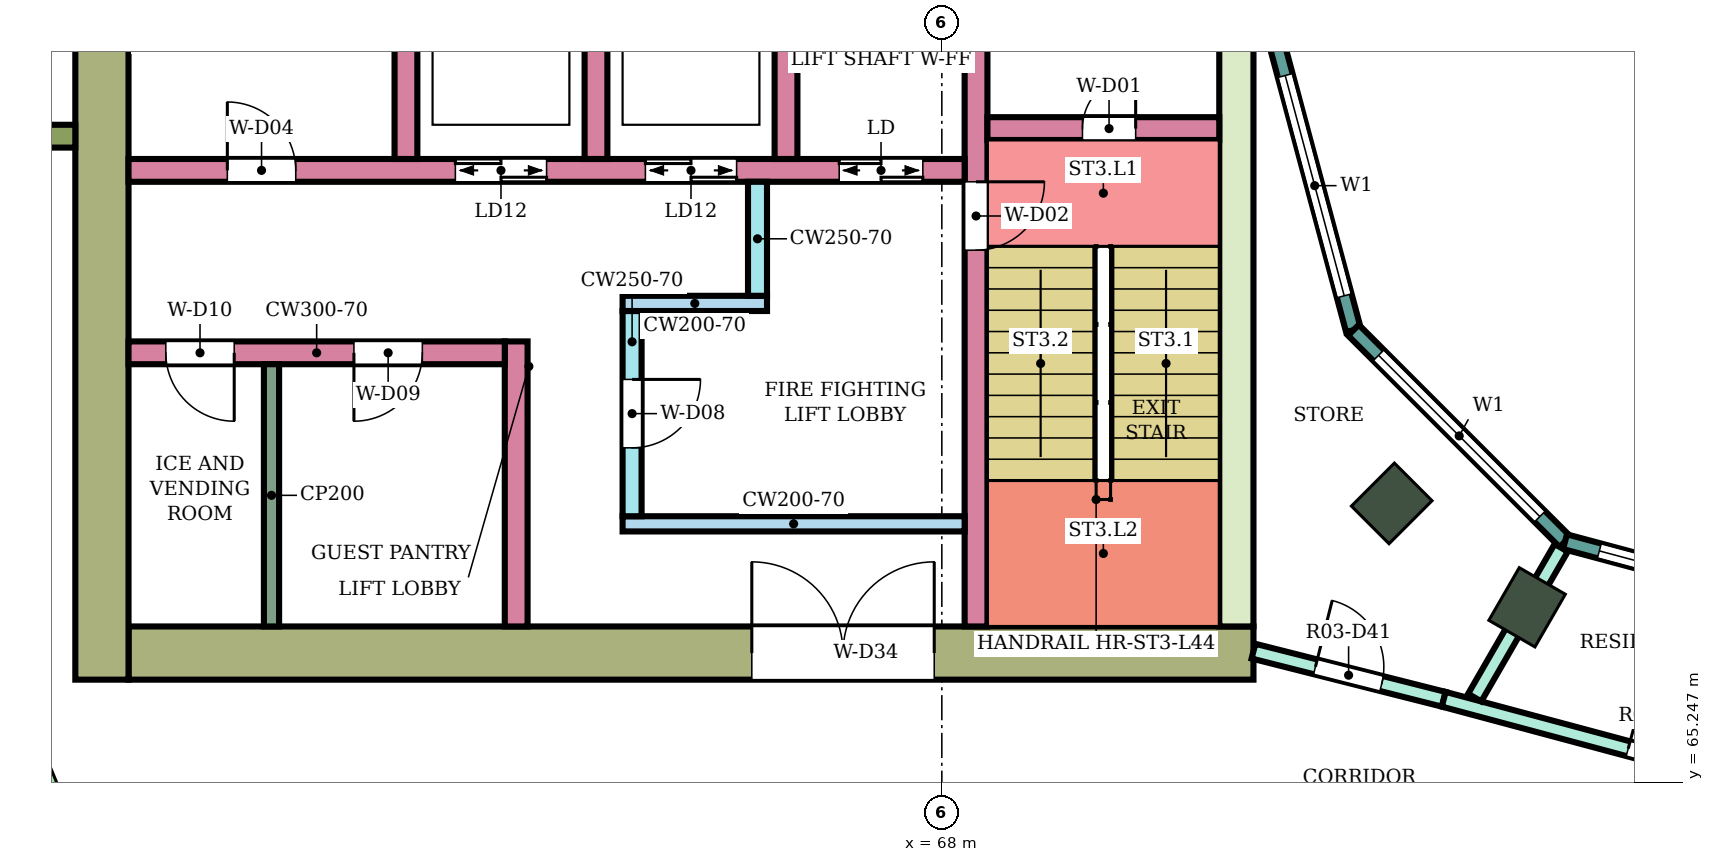
"""IFC4 building model, lengths in metres.
Left out: names, types, materials, properties, quantities, classifications, styles, units other than length and angle.
Written with IfcOpenShell. Run it as: python <this file> out.ifc"""

import sys

from ifc_helpers import new_model, si_unit, direction, frame, frame_2d, origin, origin_2d, place, context, subcontext, project, spatial, rectangle, extrude, element, fill, save


model = new_model("IFC4")
c1 = context("Model", 3, precision=1e-05, world=origin(), true_north=direction((0.0, 1.0)))
c2 = subcontext(c1, "Body", "Model", "MODEL_VIEW")
j1 = project(units=[si_unit("LENGTHUNIT", "METRE"), si_unit("PLANEANGLEUNIT", "RADIAN")], contexts=[c1])
p1 = place(None, origin())
s1 = spatial("IfcSite", under=j1, at=p1, CompositionType="ELEMENT")
p2 = place(p1, origin())
s2 = spatial("IfcBuilding", under=s1, at=p2, CompositionType="ELEMENT")
p3 = place(p2, frame((0.0, 0.0, 190.5)))
s3 = spatial("IfcBuildingStorey", under=s2, at=p3, CompositionType="ELEMENT", Elevation=190.5)
for number, where, z_axis, x_axis in (
    (1, (73.919, 68.919, 0.0), (0.0, 0.0, 1.0), (-0.707, -0.707, 0.0)),
    (2, (75.7, 67.552, 0.0), (0.0, 0.0, 1.0), (-0.5, -0.866, 0.0)),
):
    element("IfcColumn", number, at=place(p3, frame(where, z_axis=z_axis, x_axis=x_axis)), inside=s3, PredefinedType="COLUMN", context=c2, shape_type="SweptSolid", body=[
        extrude(rectangle(XDim=0.8, YDim=0.7, at=origin_2d()), origin(), (0.0, 0.0, 1.0), 4.1),
    ])
p4 = place(p3, frame((72.1, 66.95, 0.0), z_axis=(0.0, 0.0, 1.0), x_axis=(-1.0, 0.0, 0.0)))
e3 = element("IfcWall", 3, at=p4, inside=s3, PredefinedType="SHEAR", context=c2, shape_type="SweptSolid", body=[
    extrude(rectangle(XDim=14.8, YDim=0.7, at=frame_2d((7.4, 0.0))), origin(), (0.0, 0.0, 1.0), 3.78),
])
p5 = place(p4, frame((4.2, 0.0, 0.0)))
e4 = element("IfcOpeningElement", 4, at=p5, cuts=e3, PredefinedType="OPENING", context=c2, shape_type="SweptSolid", body=[
    extrude(rectangle(XDim=2.4, YDim=2.4, at=frame_2d((1.2, 1.2))), frame((0.0, 0.36, 0.0), z_axis=(0.0, -1.0, 0.0), x_axis=(1.0, 0.0, 0.0)), (0.0, 0.0, 1.0), 0.72),
])
p6 = place(p3, frame((71.875, 75.0, 0.0), z_axis=(0.0, 0.0, 1.0), x_axis=(0.0, -1.0, 0.0)))
e5 = element("IfcWall", 5, at=p6, inside=s3, PredefinedType="SHEAR", context=c2, shape_type="SweptSolid", body=[
    extrude(rectangle(XDim=7.7, YDim=0.45, at=frame_2d((3.85, 0.0))), origin(), (0.0, 0.0, 1.0), 3.78),
])
p7 = place(p3, frame((56.95, 83.4, 0.0), z_axis=(0.0, 0.0, 1.0), x_axis=(0.0, -1.0, 0.0)))
e6 = element("IfcWall", 6, at=p7, inside=s3, PredefinedType="SHEAR", context=c2, shape_type="SweptSolid", body=[
    extrude(rectangle(XDim=16.8, YDim=0.7, at=frame_2d((8.4, 0.0))), origin(), (0.0, 0.0, 1.0), 3.78),
])
p8 = place(p3, frame((68.45, 75.0, 0.0), z_axis=(0.0, 0.0, 1.0), x_axis=(0.0, -1.0, 0.0)))
e7 = element("IfcWall", 7, at=p8, inside=s3, PredefinedType="SHEAR", context=c2, shape_type="SweptSolid", body=[
    extrude(rectangle(XDim=7.7, YDim=0.3, at=frame_2d((3.85, 0.0))), origin(), (0.0, 0.0, 1.0), 3.78),
])
p9 = place(p8, frame((1.85, 0.0, 0.0)))
e8 = element("IfcOpeningElement", 8, at=p9, cuts=e7, PredefinedType="OPENING", context=c2, shape_type="SweptSolid", body=[
    extrude(rectangle(XDim=0.9, YDim=2.1, at=frame_2d((0.45, 1.05))), frame((0.0, 0.16, 0.0), z_axis=(0.0, -1.0, 0.0), x_axis=(1.0, 0.0, 0.0)), (0.0, 0.0, 1.0), 0.32),
])
p10 = place(p3, frame((71.65, 73.85, 0.0), z_axis=(0.0, 0.0, 1.0), x_axis=(-1.0, 0.0, 0.0)))
e9 = element("IfcWall", 9, at=p10, inside=s3, PredefinedType="SHEAR", context=c2, shape_type="SweptSolid", body=[
    extrude(rectangle(XDim=3.05, YDim=0.3, at=frame_2d((1.525, 0.0))), origin(), (0.0, 0.0, 1.0), 3.78),
])
p11 = place(p10, frame((1.1, 0.0, 0.0)))
e10 = element("IfcOpeningElement", 10, at=p11, cuts=e9, PredefinedType="OPENING", context=c2, shape_type="SweptSolid", body=[
    extrude(rectangle(XDim=0.7, YDim=2.0, at=frame_2d((0.35, 1.0))), frame((0.0, 0.16, 0.0), z_axis=(0.0, -1.0, 0.0), x_axis=(1.0, 0.0, 0.0)), (0.0, 0.0, 1.0), 0.32),
])
p12 = place(p3, frame((68.3, 73.3, 0.0), z_axis=(0.0, 0.0, 1.0), x_axis=(-1.0, 0.0, 0.0)))
e11 = element("IfcWall", 11, at=p12, inside=s3, PredefinedType="SHEAR", context=c2, shape_type="SweptSolid", body=[
    extrude(rectangle(XDim=11.0, YDim=0.3, at=frame_2d((5.5, 0.0))), origin(), (0.0, 0.0, 1.0), 3.78),
])
p13 = place(p12, frame((0.55, 0.0, 0.0)))
e12 = element("IfcOpeningElement", 12, at=p13, cuts=e11, PredefinedType="OPENING", context=c2, shape_type="SweptSolid", body=[
    extrude(rectangle(XDim=1.1, YDim=2.1, at=frame_2d((0.55, 1.05))), frame((0.0, 0.16, 0.0), z_axis=(0.0, -1.0, 0.0), x_axis=(1.0, 0.0, 0.0)), (0.0, 0.0, 1.0), 0.32),
])
p14 = place(p12, frame((3.0, 0.0, 0.0)))
e13 = element("IfcOpeningElement", 13, at=p14, cuts=e11, PredefinedType="OPENING", context=c2, shape_type="SweptSolid", body=[
    extrude(rectangle(XDim=1.2, YDim=2.1, at=frame_2d((0.6, 1.05))), frame((0.0, 0.16, 0.0), z_axis=(0.0, -1.0, 0.0), x_axis=(1.0, 0.0, 0.0)), (0.0, 0.0, 1.0), 0.32),
])
p15 = place(p12, frame((5.5, 0.0, 0.0)))
e14 = element("IfcOpeningElement", 14, at=p15, cuts=e11, PredefinedType="OPENING", context=c2, shape_type="SweptSolid", body=[
    extrude(rectangle(XDim=1.2, YDim=2.1, at=frame_2d((0.6, 1.05))), frame((0.0, 0.16, 0.0), z_axis=(0.0, -1.0, 0.0), x_axis=(1.0, 0.0, 0.0)), (0.0, 0.0, 1.0), 0.32),
])
p16 = place(p12, frame((8.8, 0.0, 0.0)))
e15 = element("IfcOpeningElement", 15, at=p16, cuts=e11, PredefinedType="OPENING", context=c2, shape_type="SweptSolid", body=[
    extrude(rectangle(XDim=0.9, YDim=2.1, at=frame_2d((0.45, 1.05))), frame((0.0, 0.16, 0.0), z_axis=(0.0, -1.0, 0.0), x_axis=(1.0, 0.0, 0.0)), (0.0, 0.0, 1.0), 0.32),
])
for number, where, z_axis, x_axis in (
    (16, (65.95, 76.0, 0.0), (0.0, 0.0, 1.0), (0.0, -1.0, 0.0)),
    (17, (63.45, 76.0, 0.0), (0.0, 0.0, 1.0), (0.0, -1.0, 0.0)),
    (18, (60.95, 76.0, 0.0), (0.0, 0.0, 1.0), (0.0, -1.0, 0.0)),
):
    element("IfcWall", number, at=place(p3, frame(where, z_axis=z_axis, x_axis=x_axis)), inside=s3, PredefinedType="SHEAR", context=c2, shape_type="SweptSolid", body=[
        extrude(rectangle(XDim=2.55, YDim=0.3, at=frame_2d((1.275, 0.0))), origin(), (0.0, 0.0, 1.0), 3.78),
    ])
p17 = place(p3, frame((68.3, 68.65, 0.0), z_axis=(0.0, 0.0, 1.0), x_axis=(-1.0, 0.0, 0.0)))
e19 = element("IfcWall", 19, at=p17, inside=s3, PredefinedType="SHEAR", context=c2, shape_type="SweptSolid", body=[
    extrude(rectangle(XDim=4.5, YDim=0.2, at=frame_2d((2.25, 0.0))), origin(), (0.0, 0.0, 1.0), 3.78),
])
p18 = place(p3, frame((63.925, 71.45, 0.0), z_axis=(0.0, 0.0, 1.0), x_axis=(0.0, -1.0, 0.0)))
e20 = element("IfcWall", 20, at=p18, inside=s3, PredefinedType="SHEAR", context=c2, shape_type="SweptSolid", body=[
    extrude(rectangle(XDim=2.7, YDim=0.25, at=frame_2d((1.35, 0.0))), origin(), (0.0, 0.0, 1.0), 3.78),
])
p19 = place(p18, frame((0.9, 0.0, 0.0)))
e21 = element("IfcOpeningElement", 21, at=p19, cuts=e20, PredefinedType="OPENING", context=c2, shape_type="SweptSolid", body=[
    extrude(rectangle(XDim=0.9, YDim=2.1, at=frame_2d((0.45, 1.05))), frame((0.0, 0.135, 0.0), z_axis=(0.0, -1.0, 0.0), x_axis=(1.0, 0.0, 0.0)), (0.0, 0.0, 1.0), 0.27),
])
p20 = place(p3, frame((65.7, 71.55, 0.0), z_axis=(0.0, 0.0, 1.0), x_axis=(-1.0, 0.0, 0.0)))
e22 = element("IfcWall", 22, at=p20, inside=s3, PredefinedType="SHEAR", context=c2, shape_type="SweptSolid", body=[
    extrude(rectangle(XDim=1.9, YDim=0.2, at=frame_2d((0.95, 0.0))), origin(), (0.0, 0.0, 1.0), 3.78),
])
p21 = place(p3, frame((65.575, 73.15, 0.0), z_axis=(0.0, 0.0, 1.0), x_axis=(0.0, -1.0, 0.0)))
e23 = element("IfcWall", 23, at=p21, inside=s3, PredefinedType="SHEAR", context=c2, shape_type="SweptSolid", body=[
    extrude(rectangle(XDim=1.5, YDim=0.25, at=frame_2d((0.75, 0.0))), origin(), (0.0, 0.0, 1.0), 3.78),
])
p22 = place(p3, frame((62.4, 71.05, 0.0), z_axis=(0.0, 0.0, 1.0), x_axis=(0.0, -1.0, 0.0)))
e24 = element("IfcWall", 24, at=p22, inside=s3, PredefinedType="SHEAR", context=c2, shape_type="SweptSolid", body=[
    extrude(rectangle(XDim=3.75, YDim=0.3, at=frame_2d((1.875, 0.0))), origin(), (0.0, 0.0, 1.0), 3.78),
])
p23 = place(p3, frame((62.25, 70.9, 0.0), z_axis=(0.0, 0.0, 1.0), x_axis=(-1.0, 0.0, 0.0)))
e25 = element("IfcWall", 25, at=p23, inside=s3, PredefinedType="SHEAR", context=c2, shape_type="SweptSolid", body=[
    extrude(rectangle(XDim=4.95, YDim=0.3, at=frame_2d((2.475, 0.0))), origin(), (0.0, 0.0, 1.0), 3.78),
])
p24 = place(p23, frame((1.084, 0.0, 0.0)))
e26 = element("IfcOpeningElement", 26, at=p24, cuts=e25, PredefinedType="OPENING", context=c2, shape_type="SweptSolid", body=[
    extrude(rectangle(XDim=0.9, YDim=2.1, at=frame_2d((0.45, 1.05))), frame((0.0, 0.16, 0.0), z_axis=(0.0, -1.0, 0.0), x_axis=(1.0, 0.0, 0.0)), (0.0, 0.0, 1.0), 0.32),
])
p25 = place(p23, frame((3.56, 0.0, 0.0)))
e27 = element("IfcOpeningElement", 27, at=p25, cuts=e25, PredefinedType="OPENING", context=c2, shape_type="SweptSolid", body=[
    extrude(rectangle(XDim=0.9, YDim=2.1, at=frame_2d((0.45, 1.05))), frame((0.0, 0.16, 0.0), z_axis=(0.0, -1.0, 0.0), x_axis=(1.0, 0.0, 0.0)), (0.0, 0.0, 1.0), 0.32),
])
p26 = place(p3, frame((56.6, 73.75, 0.0), z_axis=(0.0, 0.0, 1.0), x_axis=(-1.0, 0.0, 0.0)))
e28 = element("IfcWall", 28, at=p26, inside=s3, PredefinedType="NOTDEFINED", context=c2, shape_type="SweptSolid", body=[
    extrude(rectangle(XDim=2.416, YDim=0.3, at=frame_2d((1.208, 0.0))), origin(), (0.0, 0.0, 1.0), 4.1),
])
p27 = place(p3, frame((72.396, 75.0, 0.0), z_axis=(0.0, 0.0, 1.0), x_axis=(0.258789828301, -0.965933654434, 0.0)))
e29 = element("IfcWall", 29, at=p27, inside=s3, PredefinedType="NOTDEFINED", context=c2, shape_type="SweptSolid", body=[
    extrude(rectangle(XDim=3.936, YDim=0.2, at=frame_2d((1.968, 0.0))), origin(), (0.0, 0.0, 1.0), 4.1),
])
p28 = place(p27, frame((0.468, 0.0, 0.9)))
e30 = element("IfcOpeningElement", 30, at=p28, cuts=e29, PredefinedType="OPENING", context=c2, shape_type="SweptSolid", body=[
    extrude(rectangle(XDim=3.0, YDim=2.3, at=frame_2d((1.5, 1.15))), frame((0.0, 0.11, 0.0), z_axis=(0.0, -1.0, 0.0), x_axis=(1.0, 0.0, 0.0)), (0.0, 0.0, 1.0), 0.22),
])
p29 = place(p3, frame((73.415, 71.198, 0.0), z_axis=(0.0, 0.0, 1.0), x_axis=(0.707106781187, -0.707106781187, 0.0)))
e31 = element("IfcWall", 31, at=p29, inside=s3, PredefinedType="NOTDEFINED", context=c2, shape_type="SweptSolid", body=[
    extrude(rectangle(XDim=3.936, YDim=0.2, at=frame_2d((1.968, 0.0))), origin(), (0.0, 0.0, 1.0), 4.1),
])
p30 = place(p29, frame((0.468, 0.0, 0.9)))
e32 = element("IfcOpeningElement", 32, at=p30, cuts=e31, PredefinedType="OPENING", context=c2, shape_type="SweptSolid", body=[
    extrude(rectangle(XDim=3.0, YDim=2.3, at=frame_2d((1.5, 1.15))), frame((0.0, 0.11, 0.0), z_axis=(0.0, -1.0, 0.0), x_axis=(1.0, 0.0, 0.0)), (0.0, 0.0, 1.0), 0.22),
])
p31 = place(p3, frame((76.198, 68.415, 0.0), z_axis=(0.0, 0.0, 1.0), x_axis=(0.965933654434, -0.258789828301, 0.0)))
e33 = element("IfcWall", 33, at=p31, inside=s3, PredefinedType="NOTDEFINED", context=c2, shape_type="SweptSolid", body=[
    extrude(rectangle(XDim=3.936, YDim=0.2, at=frame_2d((1.968, 0.0))), origin(), (0.0, 0.0, 1.0), 4.1),
])
p32 = place(p31, frame((0.468, 0.0, 0.9)))
e34 = element("IfcOpeningElement", 34, at=p32, cuts=e33, PredefinedType="OPENING", context=c2, shape_type="SweptSolid", body=[
    extrude(rectangle(XDim=3.0, YDim=2.3, at=frame_2d((1.5, 1.15))), frame((0.0, 0.11, 0.0), z_axis=(0.0, -1.0, 0.0), x_axis=(1.0, 0.0, 0.0)), (0.0, 0.0, 1.0), 0.22),
])
p33 = place(p3, frame((72.1, 66.975, 0.0), z_axis=(0.0, 0.0, 1.0), x_axis=(0.969471314457, -0.245204752086, 0.0)))
e35 = element("IfcWall", 35, at=p33, inside=s3, PredefinedType="PARTITIONING", context=c2, shape_type="SweptSolid", body=[
    extrude(rectangle(XDim=2.582, YDim=0.2, at=frame_2d((1.291, 0.0))), origin(), (0.0, 0.0, 1.0), 3.65),
])
p34 = place(p33, frame((0.841, 0.0, 0.0)))
e36 = element("IfcOpeningElement", 36, at=p34, cuts=e35, PredefinedType="OPENING", context=c2, shape_type="SweptSolid", body=[
    extrude(rectangle(XDim=0.9, YDim=2.1, at=frame_2d((0.45, 1.05))), frame((0.0, 0.11, 0.0), z_axis=(0.0, -1.0, 0.0), x_axis=(1.0, 0.0, 0.0)), (0.0, 0.0, 1.0), 0.22),
])
p35 = place(p3, frame((74.603, 66.342, 0.0), z_axis=(0.0, 0.0, 1.0), x_axis=(0.965920893652, -0.258837453254, 0.0)))
e37 = element("IfcWall", 37, at=p35, inside=s3, PredefinedType="PARTITIONING", context=c2, shape_type="SweptSolid", body=[
    extrude(rectangle(XDim=5.458, YDim=0.2, at=frame_2d((2.729, 0.0))), origin(), (0.0, 0.0, 1.0), 3.65),
])
p36 = place(p35, frame((2.512, 0.0, 0.0)))
e38 = element("IfcOpeningElement", 38, at=p36, cuts=e37, PredefinedType="OPENING", context=c2, shape_type="SweptSolid", body=[
    extrude(rectangle(XDim=0.9, YDim=2.1, at=frame_2d((0.45, 1.05))), frame((0.0, 0.11, 0.0), z_axis=(0.0, -1.0, 0.0), x_axis=(1.0, 0.0, 0.0)), (0.0, 0.0, 1.0), 0.22),
])
p37 = place(p3, frame((75.01, 66.364, 0.0), z_axis=(0.0, 0.0, 1.0), x_axis=(0.500097042406, 0.865969369075, 0.0)))
e39 = element("IfcWall", 39, at=p37, inside=s3, PredefinedType="PARTITIONING", context=c2, shape_type="SweptSolid", body=[
    extrude(rectangle(XDim=2.275, YDim=0.2, at=frame_2d((1.138, 0.0))), origin(), (0.0, 0.0, 1.0), 3.65),
])
p38 = place(p3, frame((59.181, 70.75, 0.0), z_axis=(0.0, 0.0, 1.0), x_axis=(0.0, -1.0, 0.0)))
e40 = element("IfcWall", 40, at=p38, inside=s3, PredefinedType="PARTITIONING", context=c2, shape_type="SweptSolid", body=[
    extrude(rectangle(XDim=3.45, YDim=0.2, at=frame_2d((1.725, 0.0))), origin(), (0.0, 0.0, 1.0), 3.78),
])
p39 = place(p28, origin())
e41 = element("IfcWindow", 41, at=p39, inside=s3, PartitioningType="SINGLE_PANEL", PredefinedType="WINDOW", context=c2, shape_type="SweptSolid", body=[
    extrude(rectangle(XDim=3.0, YDim=2.3, at=frame_2d((1.5, 1.15))), frame((0.0, 0.03, 0.0), z_axis=(0.0, -1.0, 0.0), x_axis=(1.0, 0.0, 0.0)), (0.0, 0.0, 1.0), 0.06),
])
fill(e30, e41)
p40 = place(p30, origin())
e42 = element("IfcWindow", 42, at=p40, inside=s3, PartitioningType="SINGLE_PANEL", PredefinedType="WINDOW", context=c2, shape_type="SweptSolid", body=[
    extrude(rectangle(XDim=3.0, YDim=2.3, at=frame_2d((1.5, 1.15))), frame((0.0, 0.03, 0.0), z_axis=(0.0, -1.0, 0.0), x_axis=(1.0, 0.0, 0.0)), (0.0, 0.0, 1.0), 0.06),
])
fill(e32, e42)
p41 = place(p32, origin())
e43 = element("IfcWindow", 43, at=p41, inside=s3, PartitioningType="SINGLE_PANEL", PredefinedType="WINDOW", context=c2, shape_type="SweptSolid", body=[
    extrude(rectangle(XDim=3.0, YDim=2.3, at=frame_2d((1.5, 1.15))), frame((0.0, 0.03, 0.0), z_axis=(0.0, -1.0, 0.0), x_axis=(1.0, 0.0, 0.0)), (0.0, 0.0, 1.0), 0.06),
])
fill(e34, e43)
p42 = place(p36, origin())
e44 = element("IfcDoor", 44, at=p42, inside=s3, OperationType="SINGLE_SWING_LEFT", PredefinedType="DOOR", context=c2, shape_type="SweptSolid", body=[
    extrude(rectangle(XDim=0.9, YDim=2.1, at=frame_2d((0.45, 1.05))), frame((0.0, 0.025, 0.0), z_axis=(0.0, -1.0, 0.0), x_axis=(1.0, 0.0, 0.0)), (0.0, 0.0, 1.0), 0.05),
])
fill(e38, e44)
p43 = place(p34, origin())
e45 = element("IfcDoor", 45, at=p43, inside=s3, OperationType="SINGLE_SWING_LEFT", PredefinedType="DOOR", context=c2, shape_type="SweptSolid", body=[
    extrude(rectangle(XDim=0.9, YDim=2.1, at=frame_2d((0.45, 1.05))), frame((0.0, 0.025, 0.0), z_axis=(0.0, -1.0, 0.0), x_axis=(1.0, 0.0, 0.0)), (0.0, 0.0, 1.0), 0.05),
])
fill(e36, e45)
p44 = place(p11, frame((0.7, 0.0, 0.0), z_axis=(0.0, 0.0, 1.0), x_axis=(-1.0, 0.0, 0.0)))
e46 = element("IfcDoor", 46, at=p44, inside=s3, OperationType="SINGLE_SWING_RIGHT", PredefinedType="DOOR", context=c2, shape_type="SweptSolid", body=[
    extrude(rectangle(XDim=0.7, YDim=2.0, at=frame_2d((0.35, 1.0))), frame((0.0, 0.025, 0.0), z_axis=(0.0, -1.0, 0.0), x_axis=(1.0, 0.0, 0.0)), (0.0, 0.0, 1.0), 0.05),
])
fill(e10, e46)
p45 = place(p9, origin())
e47 = element("IfcDoor", 47, at=p45, inside=s3, OperationType="SINGLE_SWING_LEFT", PredefinedType="DOOR", context=c2, shape_type="SweptSolid", body=[
    extrude(rectangle(XDim=0.9, YDim=2.1, at=frame_2d((0.45, 1.05))), frame((0.0, 0.025, 0.0), z_axis=(0.0, -1.0, 0.0), x_axis=(1.0, 0.0, 0.0)), (0.0, 0.0, 1.0), 0.05),
])
fill(e8, e47)
p46 = place(p13, origin())
e48 = element("IfcDoor", 48, at=p46, inside=s3, OperationType="DOUBLE_DOOR_SLIDING", PredefinedType="DOOR", context=c2, shape_type="SweptSolid", body=[
    extrude(rectangle(XDim=1.1, YDim=2.1, at=frame_2d((0.55, 1.05))), frame((0.0, 0.025, 0.0), z_axis=(0.0, -1.0, 0.0), x_axis=(1.0, 0.0, 0.0)), (0.0, 0.0, 1.0), 0.05),
])
fill(e12, e48)
p47 = place(p14, origin())
e49 = element("IfcDoor", 49, at=p47, inside=s3, OperationType="DOUBLE_DOOR_SLIDING", PredefinedType="DOOR", context=c2, shape_type="SweptSolid", body=[
    extrude(rectangle(XDim=1.2, YDim=2.1, at=frame_2d((0.6, 1.05))), frame((0.0, 0.025, 0.0), z_axis=(0.0, -1.0, 0.0), x_axis=(1.0, 0.0, 0.0)), (0.0, 0.0, 1.0), 0.05),
])
fill(e13, e49)
p48 = place(p15, origin())
e50 = element("IfcDoor", 50, at=p48, inside=s3, OperationType="DOUBLE_DOOR_SLIDING", PredefinedType="DOOR", context=c2, shape_type="SweptSolid", body=[
    extrude(rectangle(XDim=1.2, YDim=2.1, at=frame_2d((0.6, 1.05))), frame((0.0, 0.025, 0.0), z_axis=(0.0, -1.0, 0.0), x_axis=(1.0, 0.0, 0.0)), (0.0, 0.0, 1.0), 0.05),
])
fill(e14, e50)
p49 = place(p16, frame((0.9, 0.0, 0.0), z_axis=(0.0, 0.0, 1.0), x_axis=(-1.0, 0.0, 0.0)))
e51 = element("IfcDoor", 51, at=p49, inside=s3, OperationType="SINGLE_SWING_LEFT", PredefinedType="DOOR", context=c2, shape_type="SweptSolid", body=[
    extrude(rectangle(XDim=0.9, YDim=2.1, at=frame_2d((0.45, 1.05))), frame((0.0, 0.025, 0.0), z_axis=(0.0, -1.0, 0.0), x_axis=(1.0, 0.0, 0.0)), (0.0, 0.0, 1.0), 0.05),
])
fill(e15, e51)
p50 = place(p19, origin())
e52 = element("IfcDoor", 52, at=p50, inside=s3, OperationType="SINGLE_SWING_LEFT", PredefinedType="DOOR", context=c2, shape_type="SweptSolid", body=[
    extrude(rectangle(XDim=0.9, YDim=2.1, at=frame_2d((0.45, 1.05))), frame((0.0, 0.025, 0.0), z_axis=(0.0, -1.0, 0.0), x_axis=(1.0, 0.0, 0.0)), (0.0, 0.0, 1.0), 0.05),
])
fill(e21, e52)
p51 = place(p24, origin())
e53 = element("IfcDoor", 53, at=p51, inside=s3, OperationType="SINGLE_SWING_RIGHT", PredefinedType="DOOR", context=c2, shape_type="SweptSolid", body=[
    extrude(rectangle(XDim=0.9, YDim=2.1, at=frame_2d((0.45, 1.05))), frame((0.0, 0.025, 0.0), z_axis=(0.0, -1.0, 0.0), x_axis=(1.0, 0.0, 0.0)), (0.0, 0.0, 1.0), 0.05),
])
fill(e26, e53)
p52 = place(p25, origin())
e54 = element("IfcDoor", 54, at=p52, inside=s3, OperationType="SINGLE_SWING_LEFT", PredefinedType="DOOR", context=c2, shape_type="SweptSolid", body=[
    extrude(rectangle(XDim=0.9, YDim=2.1, at=frame_2d((0.45, 1.05))), frame((0.0, 0.025, 0.0), z_axis=(0.0, -1.0, 0.0), x_axis=(1.0, 0.0, 0.0)), (0.0, 0.0, 1.0), 0.05),
])
fill(e27, e54)
p53 = place(p5, frame((2.4, 0.0, 0.0), z_axis=(0.0, 0.0, 1.0), x_axis=(-1.0, 0.0, 0.0)))
e55 = element("IfcDoor", 55, at=p53, inside=s3, OperationType="DOUBLE_DOOR_SINGLE_SWING", PredefinedType="DOOR", context=c2, shape_type="SweptSolid", body=[
    extrude(rectangle(XDim=2.4, YDim=2.4, at=frame_2d((1.2, 1.2))), frame((0.0, 0.025, 0.0), z_axis=(0.0, -1.0, 0.0), x_axis=(1.0, 0.0, 0.0)), (0.0, 0.0, 1.0), 0.05),
])
fill(e4, e55)
save(model, sys.argv[1])
